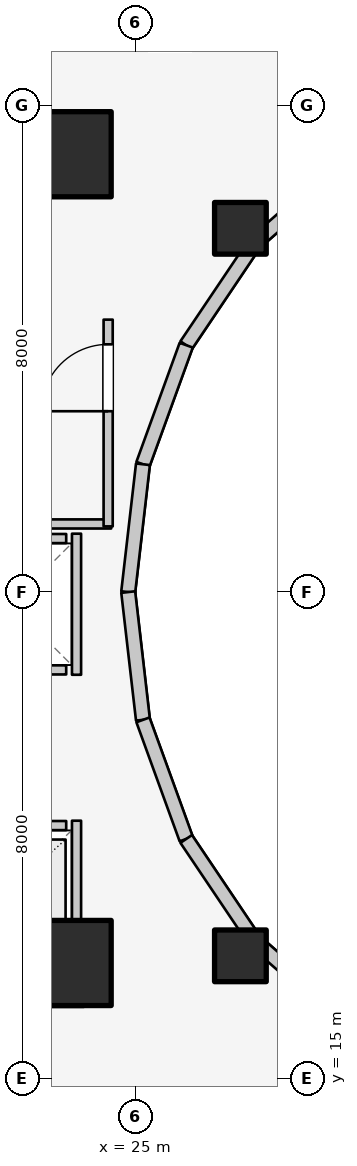
"""IFC4 building model, lengths in metres.
Left out: names, types, materials, properties, quantities, classifications, styles, units other than length and angle.
Written with IfcOpenShell. Run it as: python <this file> out.ifc"""

import sys

from ifc_helpers import new_model, si_unit, direction, frame, frame_2d, origin, origin_2d, place, context, subcontext, project, spatial, rectangle, extrude, element, fill, save


model = new_model("IFC4")
c1 = context("Model", 3, precision=1e-05, world=origin(), true_north=direction((0.0, 1.0)))
c2 = subcontext(c1, "Body", "Model", "MODEL_VIEW")
j1 = project(units=[si_unit("LENGTHUNIT", "METRE"), si_unit("PLANEANGLEUNIT", "RADIAN")], contexts=[c1])
p1 = place(None, origin())
s1 = spatial("IfcSite", under=j1, at=p1, CompositionType="ELEMENT")
p2 = place(p1, origin())
s2 = spatial("IfcBuilding", under=s1, at=p2, CompositionType="ELEMENT")
p3 = place(p2, frame((0.0, 0.0, 91.8)))
s3 = spatial("IfcBuildingStorey", under=s2, at=p3, CompositionType="ELEMENT", Elevation=91.8)
for number, where, z_axis, x_axis in (
    (1, (19.65, 16.55, 0.0), (0.0, 0.0, 1.0), (1.0, 0.0, 0.0)),
    (2, (19.65, 30.35, 0.0), (0.0, 0.0, 1.0), (1.0, 0.0, 0.0)),
):
    element("IfcWall", number, at=place(p3, frame(where, z_axis=z_axis, x_axis=x_axis)), inside=s3, PredefinedType="SHEAR", context=c2, shape_type="SweptSolid", body=[
        extrude(rectangle(XDim=4.5, YDim=0.7, at=frame_2d((2.25, 0.0))), origin(), (0.0, 0.0, 1.0), 3.1),
    ])
for number, where, z_axis, x_axis in (
    (3, (23.9, 16.9, 0.0), (0.0, 0.0, 1.0), (1.0, 0.0, 0.0)),
    (4, (23.9, 30.2, 0.0), (0.0, 0.0, 1.0), (1.0, 0.0, 0.0)),
):
    element("IfcColumn", number, at=place(p3, frame(where, z_axis=z_axis, x_axis=x_axis)), inside=s3, PredefinedType="COLUMN", context=c2, shape_type="SweptSolid", body=[
        extrude(rectangle(XDim=1.4, YDim=1.4, at=origin_2d()), origin(), (0.0, 0.0, 1.0), 3.1),
    ])
for number, where, z_axis, x_axis in (
    (5, (26.725, 28.982, 0.0), (0.0, 0.0, 1.0), (1.0, 0.0, 0.0)),
    (6, (26.725, 17.018, 0.0), (0.0, 0.0, 1.0), (1.0, 0.0, 0.0)),
):
    element("IfcColumn", number, at=place(p3, frame(where, z_axis=z_axis, x_axis=x_axis)), inside=s3, PredefinedType="COLUMN", context=c2, shape_type="SweptSolid", body=[
        extrude(rectangle(XDim=0.85, YDim=0.85, at=origin_2d()), origin(), (0.0, 0.0, 1.0), 3.1),
    ])
p4 = place(p3, frame((28.44, 30.032, 0.0), z_axis=(0.0, 0.0, 1.0), x_axis=(-0.752576694707, -0.658504607869, 0.0)))
e7 = element("IfcWall", 7, at=p4, inside=s3, PredefinedType="STANDARD", context=c2, shape_type="SweptSolid", body=[
    extrude(rectangle(XDim=1.959, YDim=0.23, at=frame_2d((0.98, 0.0))), origin(), (0.0, 0.0, 1.0), 1.22),
])
p5 = place(p3, frame((26.965, 28.742, 0.0), z_axis=(0.0, 0.0, 1.0), x_axis=(-0.558197800898, -0.829707909492, 0.0)))
e8 = element("IfcWall", 8, at=p5, inside=s3, PredefinedType="STANDARD", context=c2, shape_type="SweptSolid", body=[
    extrude(rectangle(XDim=2.027, YDim=0.23, at=frame_2d((1.013, 0.0))), origin(), (0.0, 0.0, 1.0), 1.22),
])
p6 = place(p3, frame((25.834, 27.06, 0.0), z_axis=(0.0, 0.0, 1.0), x_axis=(-0.341423187295, -0.93990968033, 0.0)))
e9 = element("IfcWall", 9, at=p6, inside=s3, PredefinedType="STANDARD", context=c2, shape_type="SweptSolid", body=[
    extrude(rectangle(XDim=2.084, YDim=0.23, at=frame_2d((1.042, 0.0))), origin(), (0.0, 0.0, 1.0), 2.56),
])
for number, where, z_axis, x_axis in (
    (10, (25.123, 25.102, 0.0), (0.0, 0.0, 1.0), (-0.115, -0.993, 0.0)),
    (11, (24.88, 23.0, 0.0), (0.0, 0.0, 1.0), (0.115, -0.993, 0.0)),
):
    element("IfcWall", number, at=place(p3, frame(where, z_axis=z_axis, x_axis=x_axis)), inside=s3, PredefinedType="STANDARD", context=c2, shape_type="SweptSolid", body=[
        extrude(rectangle(XDim=2.115, YDim=0.23, at=frame_2d((1.058, 0.0))), origin(), (0.0, 0.0, 1.0), 2.56),
    ])
p7 = place(p3, frame((25.123, 20.898, 0.0), z_axis=(0.0, 0.0, 1.0), x_axis=(0.341423187295, -0.93990968033, 0.0)))
e12 = element("IfcWall", 12, at=p7, inside=s3, PredefinedType="STANDARD", context=c2, shape_type="SweptSolid", body=[
    extrude(rectangle(XDim=2.084, YDim=0.23, at=frame_2d((1.042, 0.0))), origin(), (0.0, 0.0, 1.0), 2.56),
])
p8 = place(p3, frame((25.834, 18.94, 0.0), z_axis=(0.0, 0.0, 1.0), x_axis=(0.558197800898, -0.829707909492, 0.0)))
e13 = element("IfcWall", 13, at=p8, inside=s3, PredefinedType="STANDARD", context=c2, shape_type="SweptSolid", body=[
    extrude(rectangle(XDim=2.027, YDim=0.23, at=frame_2d((1.013, 0.0))), origin(), (0.0, 0.0, 1.0), 1.22),
])
p9 = place(p3, frame((26.965, 17.258, 0.0), z_axis=(0.0, 0.0, 1.0), x_axis=(0.752576694707, -0.658504607869, 0.0)))
e14 = element("IfcWall", 14, at=p9, inside=s3, PredefinedType="STANDARD", context=c2, shape_type="SweptSolid", body=[
    extrude(rectangle(XDim=1.959, YDim=0.23, at=frame_2d((0.98, 0.0))), origin(), (0.0, 0.0, 1.0), 1.22),
])
p10 = place(p3, frame((22.04, 19.16, 0.0), z_axis=(0.0, 0.0, 1.0), x_axis=(1.0, 0.0, 0.0)))
e15 = element("IfcWall", 15, at=p10, inside=s3, PredefinedType="SOLIDWALL", context=c2, shape_type="SweptSolid", body=[
    extrude(rectangle(XDim=1.82, YDim=0.15, at=frame_2d((0.91, 0.0))), origin(), (0.0, 0.0, 1.0), 2.12),
])
p11 = place(p10, frame((0.36, 0.0, 0.0)))
e16 = element("IfcOpeningElement", 16, at=p11, cuts=e15, PredefinedType="OPENING", context=c2, shape_type="SweptSolid", body=[
    extrude(rectangle(XDim=1.1, YDim=2.1, at=frame_2d((0.55, 1.05))), frame((0.0, 0.085, 0.0), z_axis=(0.0, -1.0, 0.0), x_axis=(1.0, 0.0, 0.0)), (0.0, 0.0, 1.0), 0.17),
])
p12 = place(p3, frame((22.04, 17.1, 0.0), z_axis=(0.0, 0.0, 1.0), x_axis=(1.0, 0.0, 0.0)))
e17 = element("IfcWall", 17, at=p12, inside=s3, PredefinedType="SOLIDWALL", context=c2, shape_type="SweptSolid", body=[
    extrude(rectangle(XDim=1.82, YDim=0.15, at=frame_2d((0.91, 0.0))), origin(), (0.0, 0.0, 1.0), 2.12),
])
p13 = place(p3, frame((24.03, 17.02, 0.0), z_axis=(0.0, 0.0, 1.0), x_axis=(0.0, 1.0, 0.0)))
e18 = element("IfcWall", 18, at=p13, inside=s3, PredefinedType="SOLIDWALL", context=c2, shape_type="SweptSolid", body=[
    extrude(rectangle(XDim=2.22, YDim=0.15, at=frame_2d((1.11, 0.0))), origin(), (0.0, 0.0, 1.0), 1.873),
])
for number, where, z_axis, x_axis in (
    (19, (22.04, 21.72, 0.0), (0.0, 0.0, 1.0), (1.0, 0.0, 0.0)),
    (20, (22.04, 23.88, 0.0), (0.0, 0.0, 1.0), (1.0, 0.0, 0.0)),
):
    element("IfcWall", number, at=place(p3, frame(where, z_axis=z_axis, x_axis=x_axis)), inside=s3, PredefinedType="SOLIDWALL", context=c2, shape_type="SweptSolid", body=[
        extrude(rectangle(XDim=1.82, YDim=0.15, at=frame_2d((0.91, 0.0))), origin(), (0.0, 0.0, 1.0), 2.12),
    ])
p14 = place(p3, frame((24.03, 21.64, 0.0), z_axis=(0.0, 0.0, 1.0), x_axis=(0.0, 1.0, 0.0)))
e21 = element("IfcWall", 21, at=p14, inside=s3, PredefinedType="SOLIDWALL", context=c2, shape_type="SweptSolid", body=[
    extrude(rectangle(XDim=2.32, YDim=0.15, at=frame_2d((1.16, 0.0))), origin(), (0.0, 0.0, 1.0), 2.12),
])
p15 = place(p3, frame((19.52, 24.12, 0.0), z_axis=(0.0, 0.0, 1.0), x_axis=(1.0, 0.0, 0.0)))
e22 = element("IfcWall", 22, at=p15, inside=s3, PredefinedType="PARTITIONING", context=c2, shape_type="SweptSolid", body=[
    extrude(rectangle(XDim=5.08, YDim=0.15, at=frame_2d((2.54, 0.0))), origin(), (0.0, 0.0, 1.0), 2.12),
])
p16 = place(p3, frame((24.55, 24.08, 0.0), z_axis=(0.0, 0.0, 1.0), x_axis=(0.0, 1.0, 0.0)))
e23 = element("IfcWall", 23, at=p16, inside=s3, PredefinedType="PARTITIONING", context=c2, shape_type="SweptSolid", body=[
    extrude(rectangle(XDim=3.4, YDim=0.15, at=frame_2d((1.7, 0.0))), origin(), (0.0, 0.0, 1.0), 2.575),
])
p17 = place(p16, frame((1.894, 0.0, 0.0)))
e24 = element("IfcOpeningElement", 24, at=p17, cuts=e23, PredefinedType="OPENING", context=c2, shape_type="SweptSolid", body=[
    extrude(rectangle(XDim=1.1, YDim=2.1, at=frame_2d((0.55, 1.05))), frame((0.0, 0.085, 0.0), z_axis=(0.0, -1.0, 0.0), x_axis=(1.0, 0.0, 0.0)), (0.0, 0.0, 1.0), 0.17),
])
p18 = place(p17, origin())
e25 = element("IfcDoor", 25, at=p18, inside=s3, OperationType="SINGLE_SWING_LEFT", PredefinedType="DOOR", context=c2, shape_type="SweptSolid", body=[
    extrude(rectangle(XDim=1.1, YDim=2.1, at=frame_2d((0.55, 1.05))), frame((0.0, 0.025, 0.0), z_axis=(0.0, -1.0, 0.0), x_axis=(1.0, 0.0, 0.0)), (0.0, 0.0, 1.0), 0.05),
])
fill(e24, e25)
save(model, sys.argv[1])
